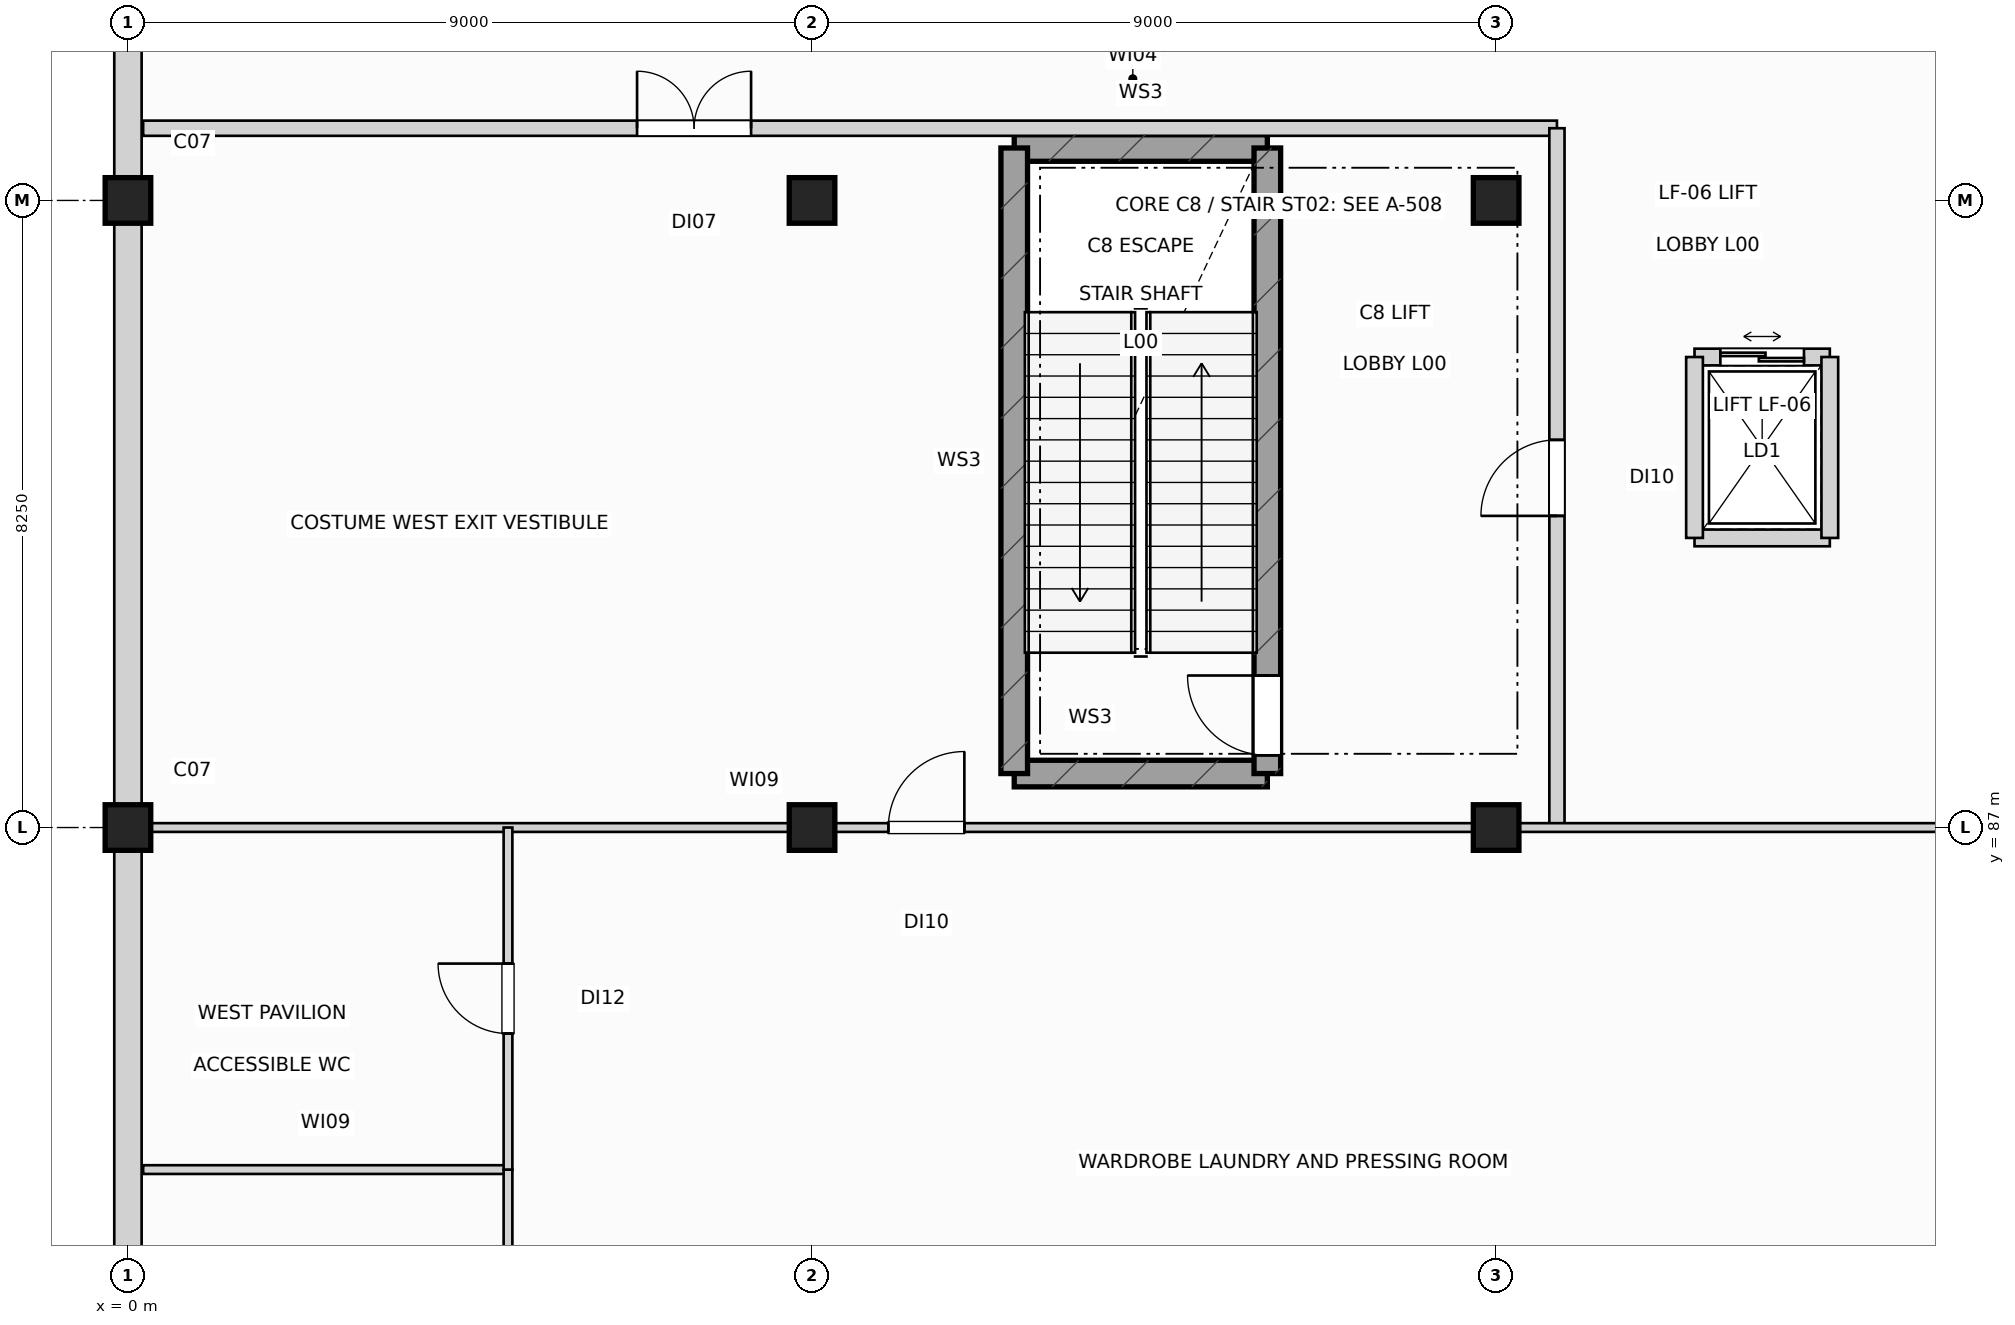
"""IFC4 building model, lengths in metres.
Left out: names, types, materials, properties, quantities, classifications, styles, units other than length and angle.
Written with IfcOpenShell. Run it as: python <this file> out.ifc"""

import sys

from ifc_helpers import new_model, si_unit, direction, frame, frame_2d, origin, origin_2d, place, context, subcontext, project, spatial, rectangle, extrude, element, fill, save


model = new_model("IFC4")
c1 = context("Model", 3, precision=1e-05, world=origin(), true_north=direction((0.0, 1.0)))
c2 = subcontext(c1, "Body", "Model", "MODEL_VIEW")
j1 = project(units=[si_unit("LENGTHUNIT", "METRE"), si_unit("PLANEANGLEUNIT", "RADIAN")], contexts=[c1])
p1 = place(None, origin())
s1 = spatial("IfcSite", under=j1, at=p1, CompositionType="ELEMENT")
p2 = place(p1, origin())
s2 = spatial("IfcBuilding", under=s1, at=p2, CompositionType="ELEMENT")
p3 = place(p2, origin())
s3 = spatial("IfcBuildingStorey", under=s2, at=p3, CompositionType="ELEMENT", Elevation=0.0)
for number, where, z_axis, x_axis in (
    (1, (0.0, 87.0, 0.0), (0.0, 0.0, 1.0), (1.0, 0.0, 0.0)),
    (2, (0.0, 95.25, 0.0), (0.0, 0.0, 1.0), (1.0, 0.0, 0.0)),
    (3, (9.0, 87.0, 0.0), (0.0, 0.0, 1.0), (1.0, 0.0, 0.0)),
    (4, (9.0, 95.25, 0.0), (0.0, 0.0, 1.0), (1.0, 0.0, 0.0)),
    (5, (18.0, 87.0, 0.0), (0.0, 0.0, 1.0), (1.0, 0.0, 0.0)),
    (6, (18.0, 95.25, 0.0), (0.0, 0.0, 1.0), (1.0, 0.0, 0.0)),
):
    element("IfcColumn", number, at=place(p3, frame(where, z_axis=z_axis, x_axis=x_axis)), inside=s3, PredefinedType="COLUMN", context=c2, shape_type="SweptSolid", body=[
        extrude(rectangle(XDim=0.6, YDim=0.6, at=origin_2d()), origin(), (0.0, 0.0, 1.0), 6.0),
    ])
p4 = place(p3, frame((0.0, 94.955, 0.0), z_axis=(0.0, 0.0, 1.0), x_axis=(0.0, -1.0, 0.0)))
e7 = element("IfcWall", 7, at=p4, inside=s3, PredefinedType="SOLIDWALL", context=c2, shape_type="SweptSolid", body=[
    extrude(rectangle(XDim=7.66, YDim=0.36, at=frame_2d((3.83, 0.0))), origin(), (0.0, 0.0, 1.0), 4.965),
])
p5 = place(p3, frame((0.0, 103.205, 0.0), z_axis=(0.0, 0.0, 1.0), x_axis=(0.0, -1.0, 0.0)))
e8 = element("IfcWall", 8, at=p5, inside=s3, PredefinedType="SOLIDWALL", context=c2, shape_type="SweptSolid", body=[
    extrude(rectangle(XDim=7.66, YDim=0.36, at=frame_2d((3.83, 0.0))), origin(), (0.0, 0.0, 1.0), 4.965),
])
p6 = place(p5, frame((2.98, 0.0, 0.85)))
e9 = element("IfcOpeningElement", 9, at=p6, cuts=e8, PredefinedType="OPENING", context=c2, shape_type="SweptSolid", body=[
    extrude(rectangle(XDim=1.7, YDim=2.15, at=frame_2d((0.85, 1.075))), frame((0.0, 0.19, 0.0), z_axis=(0.0, -1.0, 0.0), x_axis=(1.0, 0.0, 0.0)), (0.0, 0.0, 1.0), 0.38),
])
p7 = place(p3, frame((0.0, 86.705, 0.0), z_axis=(0.0, 0.0, 1.0), x_axis=(0.0, -1.0, 0.0)))
e10 = element("IfcWall", 10, at=p7, inside=s3, PredefinedType="SOLIDWALL", context=c2, shape_type="SweptSolid", body=[
    extrude(rectangle(XDim=8.41, YDim=0.36, at=frame_2d((4.205, 0.0))), origin(), (0.0, 0.0, 1.0), 5.065),
])
for number, where, z_axis, x_axis in (
    (11, (11.66, 87.71, 0.0), (0.0, 0.0, 1.0), (1.0, 0.0, 0.0)),
    (12, (11.66, 95.94, 0.0), (0.0, 0.0, 1.0), (1.0, 0.0, 0.0)),
):
    element("IfcWall", number, at=place(p3, frame(where, z_axis=z_axis, x_axis=x_axis)), inside=s3, PredefinedType="SHEAR", context=c2, shape_type="SweptSolid", body=[
        extrude(rectangle(XDim=3.33, YDim=0.35, at=frame_2d((1.665, 0.0))), origin(), (0.0, 0.0, 1.0), 5.7),
    ])
p8 = place(p3, frame((11.66, 87.71, 0.0), z_axis=(0.0, 0.0, 1.0), x_axis=(0.0, 1.0, 0.0)))
e13 = element("IfcWall", 13, at=p8, inside=s3, PredefinedType="SHEAR", context=c2, shape_type="SweptSolid", body=[
    extrude(rectangle(XDim=8.23, YDim=0.35, at=frame_2d((4.115, 0.0))), origin(), (0.0, 0.0, 1.0), 5.7),
])
p9 = place(p3, frame((14.99, 87.71, 0.0), z_axis=(0.0, 0.0, 1.0), x_axis=(0.0, 1.0, 0.0)))
e14 = element("IfcWall", 14, at=p9, inside=s3, PredefinedType="SHEAR", context=c2, shape_type="SweptSolid", body=[
    extrude(rectangle(XDim=8.23, YDim=0.35, at=frame_2d((4.115, 0.0))), origin(), (0.0, 0.0, 1.0), 5.7),
])
p10 = place(p9, frame((0.24, 0.0, 0.0)))
e15 = element("IfcOpeningElement", 15, at=p10, cuts=e14, PredefinedType="OPENING", context=c2, shape_type="SweptSolid", body=[
    extrude(rectangle(XDim=1.05, YDim=2.18, at=frame_2d((0.525, 1.09))), frame((0.0, 0.185, 0.0), z_axis=(0.0, -1.0, 0.0), x_axis=(1.0, 0.0, 0.0)), (0.0, 0.0, 1.0), 0.37),
])
p11 = place(p3, frame((20.61, 90.81, 0.0), z_axis=(0.0, 0.0, 1.0), x_axis=(1.0, 0.0, 0.0)))
e16 = element("IfcWall", 16, at=p11, inside=s3, PredefinedType="PARTITIONING", context=c2, shape_type="SweptSolid", body=[
    extrude(rectangle(XDim=1.78, YDim=0.22, at=frame_2d((0.89, 0.0))), origin(), (0.0, 0.0, 1.0), 5.665),
])
p12 = place(p3, frame((20.61, 93.19, 0.0), z_axis=(0.0, 0.0, 1.0), x_axis=(1.0, 0.0, 0.0)))
e17 = element("IfcWall", 17, at=p12, inside=s3, PredefinedType="PARTITIONING", context=c2, shape_type="SweptSolid", body=[
    extrude(rectangle(XDim=1.78, YDim=0.22, at=frame_2d((0.89, 0.0))), origin(), (0.0, 0.0, 1.0), 5.665),
])
p13 = place(p12, frame((0.34, 0.0, 0.0)))
e18 = element("IfcOpeningElement", 18, at=p13, cuts=e17, PredefinedType="OPENING", context=c2, shape_type="SweptSolid", body=[
    extrude(rectangle(XDim=1.1, YDim=2.18, at=frame_2d((0.55, 1.09))), frame((0.0, 0.12, 0.0), z_axis=(0.0, -1.0, 0.0), x_axis=(1.0, 0.0, 0.0)), (0.0, 0.0, 1.0), 0.24),
])
for number, where, z_axis, x_axis in (
    (19, (20.61, 90.81, 0.0), (0.0, 0.0, 1.0), (0.0, 1.0, 0.0)),
    (20, (22.39, 90.81, 0.0), (0.0, 0.0, 1.0), (0.0, 1.0, 0.0)),
):
    element("IfcWall", number, at=place(p3, frame(where, z_axis=z_axis, x_axis=x_axis)), inside=s3, PredefinedType="PARTITIONING", context=c2, shape_type="SweptSolid", body=[
        extrude(rectangle(XDim=2.38, YDim=0.22, at=frame_2d((1.19, 0.0))), origin(), (0.0, 0.0, 1.0), 5.665),
    ])
p14 = place(p3, frame((0.2, 96.2, 0.0), z_axis=(0.0, 0.0, 1.0), x_axis=(1.0, 0.0, 0.0)))
e21 = element("IfcWall", 21, at=p14, inside=s3, PredefinedType="PARTITIONING", context=c2, shape_type="SweptSolid", body=[
    extrude(rectangle(XDim=18.6, YDim=0.2, at=frame_2d((9.3, 0.0))), origin(), (0.0, 0.0, 1.0), 5.015),
])
p15 = place(p14, frame((6.498, 0.0, 0.0)))
e22 = element("IfcOpeningElement", 22, at=p15, cuts=e21, PredefinedType="OPENING", context=c2, shape_type="SweptSolid", body=[
    extrude(rectangle(XDim=1.5, YDim=2.2, at=frame_2d((0.75, 1.1))), frame((0.0, 0.11, 0.0), z_axis=(0.0, -1.0, 0.0), x_axis=(1.0, 0.0, 0.0)), (0.0, 0.0, 1.0), 0.22),
])
p16 = place(p3, frame((18.8, 87.0, 0.0), z_axis=(0.0, 0.0, 1.0), x_axis=(0.0, 1.0, 0.0)))
e23 = element("IfcWall", 23, at=p16, inside=s3, PredefinedType="PARTITIONING", context=c2, shape_type="SweptSolid", body=[
    extrude(rectangle(XDim=9.2, YDim=0.2, at=frame_2d((4.6, 0.0))), origin(), (0.0, 0.0, 1.0), 5.015),
])
p17 = place(p16, frame((4.1, 0.0, 0.0)))
e24 = element("IfcOpeningElement", 24, at=p17, cuts=e23, PredefinedType="OPENING", context=c2, shape_type="SweptSolid", body=[
    extrude(rectangle(XDim=1.0, YDim=2.12, at=frame_2d((0.5, 1.06))), frame((0.0, 0.11, 0.0), z_axis=(0.0, -1.0, 0.0), x_axis=(1.0, 0.0, 0.0)), (0.0, 0.0, 1.0), 0.22),
])
p18 = place(p3, frame((0.2, 82.5, 0.0), z_axis=(0.0, 0.0, 1.0), x_axis=(1.0, 0.0, 0.0)))
e25 = element("IfcWall", 25, at=p18, inside=s3, PredefinedType="PARTITIONING", context=c2, shape_type="SweptSolid", body=[
    extrude(rectangle(XDim=4.8, YDim=0.115, at=frame_2d((2.4, 0.0))), origin(), (0.0, 0.0, 1.0), 5.115),
])
p19 = place(p3, frame((0.2, 87.0, 0.0), z_axis=(0.0, 0.0, 1.0), x_axis=(1.0, 0.0, 0.0)))
e26 = element("IfcWall", 26, at=p19, inside=s3, PredefinedType="PARTITIONING", context=c2, shape_type="SweptSolid", body=[
    extrude(rectangle(XDim=26.8, YDim=0.115, at=frame_2d((13.4, 0.0))), origin(), (0.0, 0.0, 1.0), 4.715),
])
p20 = place(p19, frame((9.804, 0.0, 0.0)))
e27 = element("IfcOpeningElement", 27, at=p20, cuts=e26, PredefinedType="OPENING", context=c2, shape_type="SweptSolid", body=[
    extrude(rectangle(XDim=1.0, YDim=2.12, at=frame_2d((0.5, 1.06))), frame((0.0, 0.067, 0.0), z_axis=(0.0, -1.0, 0.0), x_axis=(1.0, 0.0, 0.0)), (0.0, 0.0, 1.0), 0.135),
])
p21 = place(p3, frame((5.0, 78.0, 0.0), z_axis=(0.0, 0.0, 1.0), x_axis=(0.0, 1.0, 0.0)))
e28 = element("IfcWall", 28, at=p21, inside=s3, PredefinedType="PARTITIONING", context=c2, shape_type="SweptSolid", body=[
    extrude(rectangle(XDim=4.5, YDim=0.115, at=frame_2d((2.25, 0.0))), origin(), (0.0, 0.0, 1.0), 5.065),
])
p22 = place(p21, frame((1.81, 0.0, 0.0)))
e29 = element("IfcOpeningElement", 29, at=p22, cuts=e28, PredefinedType="OPENING", context=c2, shape_type="SweptSolid", body=[
    extrude(rectangle(XDim=0.88, YDim=2.06, at=frame_2d((0.44, 1.03))), frame((0.0, 0.067, 0.0), z_axis=(0.0, -1.0, 0.0), x_axis=(1.0, 0.0, 0.0)), (0.0, 0.0, 1.0), 0.135),
])
p23 = place(p3, frame((5.0, 82.5, 0.0), z_axis=(0.0, 0.0, 1.0), x_axis=(0.0, 1.0, 0.0)))
e30 = element("IfcWall", 30, at=p23, inside=s3, PredefinedType="PARTITIONING", context=c2, shape_type="SweptSolid", body=[
    extrude(rectangle(XDim=4.5, YDim=0.115, at=frame_2d((2.25, 0.0))), origin(), (0.0, 0.0, 1.0), 5.175),
])
p24 = place(p23, frame((1.79, 0.0, 0.0)))
e31 = element("IfcOpeningElement", 31, at=p24, cuts=e30, PredefinedType="OPENING", context=c2, shape_type="SweptSolid", body=[
    extrude(rectangle(XDim=0.92, YDim=2.08, at=frame_2d((0.46, 1.04))), frame((0.0, 0.067, 0.0), z_axis=(0.0, -1.0, 0.0), x_axis=(1.0, 0.0, 0.0)), (0.0, 0.0, 1.0), 0.135),
])
p25 = place(p10, origin())
e32 = element("IfcDoor", 32, at=p25, inside=s3, OperationType="SINGLE_SWING_RIGHT", PredefinedType="DOOR", context=c2, shape_type="SweptSolid", body=[
    extrude(rectangle(XDim=1.05, YDim=2.18, at=frame_2d((0.525, 1.09))), frame((0.0, 0.025, 0.0), z_axis=(0.0, -1.0, 0.0), x_axis=(1.0, 0.0, 0.0)), (0.0, 0.0, 1.0), 0.05),
])
fill(e15, e32)
p26 = place(p13, origin())
e33 = element("IfcDoor", 33, at=p26, inside=s3, OperationType="DOUBLE_DOOR_SLIDING", PredefinedType="DOOR", context=c2, shape_type="SweptSolid", body=[
    extrude(rectangle(XDim=1.1, YDim=2.18, at=frame_2d((0.55, 1.09))), frame((0.0, 0.025, 0.0), z_axis=(0.0, -1.0, 0.0), x_axis=(1.0, 0.0, 0.0)), (0.0, 0.0, 1.0), 0.05),
])
fill(e18, e33)
p27 = place(p15, origin())
e34 = element("IfcDoor", 34, at=p27, inside=s3, OperationType="DOUBLE_DOOR_SINGLE_SWING", PredefinedType="DOOR", context=c2, shape_type="SweptSolid", body=[
    extrude(rectangle(XDim=1.5, YDim=2.2, at=frame_2d((0.75, 1.1))), frame((0.0, 0.025, 0.0), z_axis=(0.0, -1.0, 0.0), x_axis=(1.0, 0.0, 0.0)), (0.0, 0.0, 1.0), 0.05),
])
fill(e22, e34)
p28 = place(p17, origin())
e35 = element("IfcDoor", 35, at=p28, inside=s3, OperationType="SINGLE_SWING_LEFT", PredefinedType="DOOR", context=c2, shape_type="SweptSolid", body=[
    extrude(rectangle(XDim=1.0, YDim=2.12, at=frame_2d((0.5, 1.06))), frame((0.0, 0.025, 0.0), z_axis=(0.0, -1.0, 0.0), x_axis=(1.0, 0.0, 0.0)), (0.0, 0.0, 1.0), 0.05),
])
fill(e24, e35)
p29 = place(p20, origin())
e36 = element("IfcDoor", 36, at=p29, inside=s3, OperationType="SINGLE_SWING_RIGHT", PredefinedType="DOOR", context=c2, shape_type="SweptSolid", body=[
    extrude(rectangle(XDim=1.0, YDim=2.12, at=frame_2d((0.5, 1.06))), frame((0.0, 0.025, 0.0), z_axis=(0.0, -1.0, 0.0), x_axis=(1.0, 0.0, 0.0)), (0.0, 0.0, 1.0), 0.05),
])
fill(e27, e36)
p30 = place(p24, origin())
e37 = element("IfcDoor", 37, at=p30, inside=s3, OperationType="SINGLE_SWING_RIGHT", PredefinedType="DOOR", context=c2, shape_type="SweptSolid", body=[
    extrude(rectangle(XDim=0.92, YDim=2.08, at=frame_2d((0.46, 1.04))), frame((0.0, 0.025, 0.0), z_axis=(0.0, -1.0, 0.0), x_axis=(1.0, 0.0, 0.0)), (0.0, 0.0, 1.0), 0.05),
])
fill(e31, e37)
save(model, sys.argv[1])
